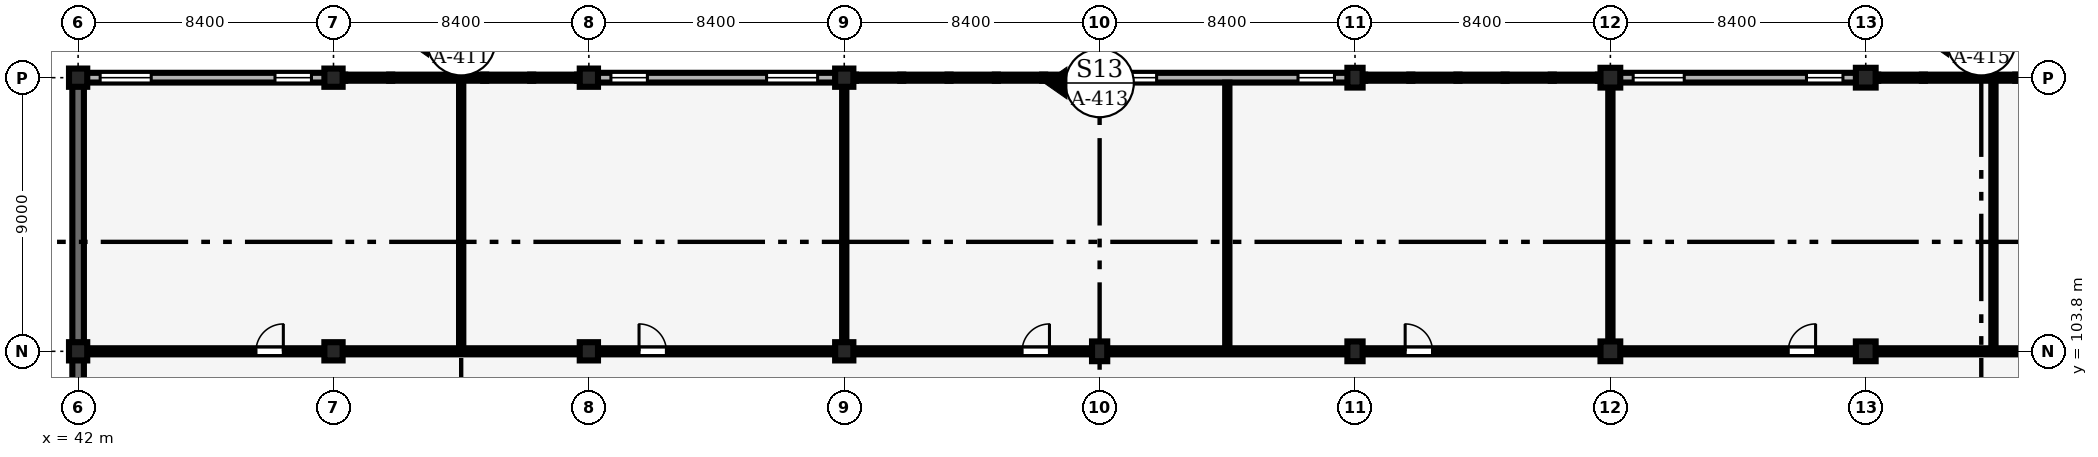
"""IFC4 building model, lengths in metres.
Left out: names, types, materials, properties, quantities, classifications, styles, units other than length and angle.
Written with IfcOpenShell. Run it as: python <this file> out.ifc"""

import sys

from ifc_helpers import new_model, si_unit, direction, frame, frame_2d, origin, origin_2d, place, context, subcontext, project, spatial, rectangle, extrude, element, fill, save


model = new_model("IFC4")
c1 = context("Model", 3, precision=1e-05, world=origin(), true_north=direction((0.0, 1.0)))
c2 = subcontext(c1, "Body", "Model", "MODEL_VIEW")
j1 = project(units=[si_unit("LENGTHUNIT", "METRE"), si_unit("PLANEANGLEUNIT", "RADIAN")], contexts=[c1])
p1 = place(None, origin())
s1 = spatial("IfcSite", under=j1, at=p1, CompositionType="ELEMENT")
p2 = place(p1, origin())
s2 = spatial("IfcBuilding", under=s1, at=p2, CompositionType="ELEMENT")
p3 = place(p2, frame((0.0, 0.0, 4.8)))
s3 = spatial("IfcBuildingStorey", under=s2, at=p3, CompositionType="ELEMENT", Elevation=4.8)
for number, where, z_axis, x_axis in (
    (1, (42.0, 103.8, 0.0), (0.0, 0.0, 1.0), (1.0, 0.0, 0.0)),
    (2, (42.0, 112.8, 0.0), (0.0, 0.0, 1.0), (1.0, 0.0, 0.0)),
    (3, (50.4, 103.8, 0.0), (0.0, 0.0, 1.0), (1.0, 0.0, 0.0)),
    (4, (50.4, 112.8, 0.0), (0.0, 0.0, 1.0), (1.0, 0.0, 0.0)),
    (5, (58.8, 103.8, 0.0), (0.0, 0.0, 1.0), (1.0, 0.0, 0.0)),
    (6, (58.8, 112.8, 0.0), (0.0, 0.0, 1.0), (1.0, 0.0, 0.0)),
    (7, (67.2, 103.8, 0.0), (0.0, 0.0, 1.0), (1.0, 0.0, 0.0)),
    (8, (67.2, 112.8, 0.0), (0.0, 0.0, 1.0), (1.0, 0.0, 0.0)),
):
    element("IfcColumn", number, at=place(p3, frame(where, z_axis=z_axis, x_axis=x_axis)), inside=s3, PredefinedType="COLUMN", context=c2, shape_type="SweptSolid", body=[
        extrude(rectangle(XDim=0.6, YDim=0.6, at=origin_2d()), origin(), (0.0, 0.0, 1.0), 4.2),
    ])
for number, where, z_axis, x_axis in (
    (9, (75.6, 103.8, 0.0), (0.0, 0.0, 1.0), (1.0, 0.0, 0.0)),
    (10, (75.6, 112.8, 0.0), (0.0, 0.0, 1.0), (1.0, 0.0, 0.0)),
    (11, (84.0, 103.8, 0.0), (0.0, 0.0, 1.0), (1.0, 0.0, 0.0)),
    (12, (84.0, 112.8, 0.0), (0.0, 0.0, 1.0), (1.0, 0.0, 0.0)),
):
    element("IfcColumn", number, at=place(p3, frame(where, z_axis=z_axis, x_axis=x_axis)), inside=s3, PredefinedType="COLUMN", context=c2, shape_type="SweptSolid", body=[
        extrude(rectangle(XDim=0.5, YDim=0.65, at=origin_2d()), origin(), (0.0, 0.0, 1.0), 4.2),
    ])
for number, where, z_axis, x_axis in (
    (13, (92.4, 103.8, 0.0), (0.0, 0.0, 1.0), (1.0, 0.0, 0.0)),
    (14, (92.4, 112.8, 0.0), (0.0, 0.0, 1.0), (1.0, 0.0, 0.0)),
    (15, (100.8, 103.8, 0.0), (0.0, 0.0, 1.0), (1.0, 0.0, 0.0)),
    (16, (100.8, 112.8, 0.0), (0.0, 0.0, 1.0), (1.0, 0.0, 0.0)),
):
    element("IfcColumn", number, at=place(p3, frame(where, z_axis=z_axis, x_axis=x_axis)), inside=s3, PredefinedType="COLUMN", context=c2, shape_type="SweptSolid", body=[
        extrude(rectangle(XDim=0.65, YDim=0.65, at=origin_2d()), origin(), (0.0, 0.0, 1.0), 4.2),
    ])
p4 = place(p3, frame((42.275, 112.8, 0.0), z_axis=(0.0, 0.0, 1.0), x_axis=(1.0, 0.0, 0.0)))
e17 = element("IfcWall", 17, at=p4, inside=s3, PredefinedType="SOLIDWALL", context=c2, shape_type="SweptSolid", body=[
    extrude(rectangle(XDim=7.85, YDim=0.32, at=frame_2d((3.925, 0.0))), origin(), (0.0, 0.0, 1.0), 2.77),
])
p5 = place(p4, frame((0.45, 0.0, 0.9)))
e18 = element("IfcOpeningElement", 18, at=p5, cuts=e17, PredefinedType="OPENING", context=c2, shape_type="SweptSolid", body=[
    extrude(rectangle(XDim=1.68, YDim=1.72, at=frame_2d((0.84, 0.86))), frame((0.0, 0.17, 0.0), z_axis=(0.0, -1.0, 0.0), x_axis=(1.0, 0.0, 0.0)), (0.0, 0.0, 1.0), 0.34),
])
p6 = place(p4, frame((6.2, 0.0, 0.9)))
e19 = element("IfcOpeningElement", 19, at=p6, cuts=e17, PredefinedType="OPENING", context=c2, shape_type="SweptSolid", body=[
    extrude(rectangle(XDim=1.2, YDim=1.5, at=frame_2d((0.6, 0.75))), frame((0.0, 0.17, 0.0), z_axis=(0.0, -1.0, 0.0), x_axis=(1.0, 0.0, 0.0)), (0.0, 0.0, 1.0), 0.34),
])
p7 = place(p3, frame((59.075, 112.8, 0.0), z_axis=(0.0, 0.0, 1.0), x_axis=(1.0, 0.0, 0.0)))
e20 = element("IfcWall", 20, at=p7, inside=s3, PredefinedType="SOLIDWALL", context=c2, shape_type="SweptSolid", body=[
    extrude(rectangle(XDim=7.85, YDim=0.32, at=frame_2d((3.925, 0.0))), origin(), (0.0, 0.0, 1.0), 3.32),
])
p8 = place(p7, frame((0.45, 0.0, 0.9)))
e21 = element("IfcOpeningElement", 21, at=p8, cuts=e20, PredefinedType="OPENING", context=c2, shape_type="SweptSolid", body=[
    extrude(rectangle(XDim=1.2, YDim=1.8, at=frame_2d((0.6, 0.9))), frame((0.0, 0.17, 0.0), z_axis=(0.0, -1.0, 0.0), x_axis=(1.0, 0.0, 0.0)), (0.0, 0.0, 1.0), 0.34),
])
p9 = place(p7, frame((5.57, 0.0, 0.9)))
e22 = element("IfcOpeningElement", 22, at=p9, cuts=e20, PredefinedType="OPENING", context=c2, shape_type="SweptSolid", body=[
    extrude(rectangle(XDim=1.68, YDim=2.27, at=frame_2d((0.84, 1.135))), frame((0.0, 0.17, 0.0), z_axis=(0.0, -1.0, 0.0), x_axis=(1.0, 0.0, 0.0)), (0.0, 0.0, 1.0), 0.34),
])
p10 = place(p3, frame((75.825, 112.8, 0.0), z_axis=(0.0, 0.0, 1.0), x_axis=(1.0, 0.0, 0.0)))
e23 = element("IfcWall", 23, at=p10, inside=s3, PredefinedType="SOLIDWALL", context=c2, shape_type="SweptSolid", body=[
    extrude(rectangle(XDim=7.95, YDim=0.32, at=frame_2d((3.975, 0.0))), origin(), (0.0, 0.0, 1.0), 3.22),
])
p11 = place(p10, frame((0.45, 0.0, 0.9)))
e24 = element("IfcOpeningElement", 24, at=p11, cuts=e23, PredefinedType="OPENING", context=c2, shape_type="SweptSolid", body=[
    extrude(rectangle(XDim=1.2, YDim=1.5, at=frame_2d((0.6, 0.75))), frame((0.0, 0.17, 0.0), z_axis=(0.0, -1.0, 0.0), x_axis=(1.0, 0.0, 0.0)), (0.0, 0.0, 1.0), 0.34),
])
p12 = place(p10, frame((6.3, 0.0, 0.9)))
e25 = element("IfcOpeningElement", 25, at=p12, cuts=e23, PredefinedType="OPENING", context=c2, shape_type="SweptSolid", body=[
    extrude(rectangle(XDim=1.2, YDim=1.8, at=frame_2d((0.6, 0.9))), frame((0.0, 0.17, 0.0), z_axis=(0.0, -1.0, 0.0), x_axis=(1.0, 0.0, 0.0)), (0.0, 0.0, 1.0), 0.34),
])
p13 = place(p3, frame((92.7, 112.8, 0.0), z_axis=(0.0, 0.0, 1.0), x_axis=(1.0, 0.0, 0.0)))
e26 = element("IfcWall", 26, at=p13, inside=s3, PredefinedType="SOLIDWALL", context=c2, shape_type="SweptSolid", body=[
    extrude(rectangle(XDim=7.8, YDim=0.32, at=frame_2d((3.9, 0.0))), origin(), (0.0, 0.0, 1.0), 3.12),
])
p14 = place(p13, frame((0.45, 0.0, 0.9)))
e27 = element("IfcOpeningElement", 27, at=p14, cuts=e26, PredefinedType="OPENING", context=c2, shape_type="SweptSolid", body=[
    extrude(rectangle(XDim=1.68, YDim=2.07, at=frame_2d((0.84, 1.035))), frame((0.0, 0.17, 0.0), z_axis=(0.0, -1.0, 0.0), x_axis=(1.0, 0.0, 0.0)), (0.0, 0.0, 1.0), 0.34),
])
p15 = place(p13, frame((6.15, 0.0, 0.9)))
e28 = element("IfcOpeningElement", 28, at=p15, cuts=e26, PredefinedType="OPENING", context=c2, shape_type="SweptSolid", body=[
    extrude(rectangle(XDim=1.2, YDim=1.5, at=frame_2d((0.6, 0.75))), frame((0.0, 0.17, 0.0), z_axis=(0.0, -1.0, 0.0), x_axis=(1.0, 0.0, 0.0)), (0.0, 0.0, 1.0), 0.34),
])
for number, where, z_axis, x_axis in (
    (29, (42.0, 95.075, 0.0), (0.0, 0.0, 1.0), (0.0, 1.0, 0.0)),
    (30, (42.0, 104.075, 0.0), (0.0, 0.0, 1.0), (0.0, 1.0, 0.0)),
):
    element("IfcWall", number, at=place(p3, frame(where, z_axis=z_axis, x_axis=x_axis)), inside=s3, PredefinedType="SHEAR", context=c2, shape_type="SweptSolid", body=[
        extrude(rectangle(XDim=8.45, YDim=0.38, at=frame_2d((4.225, 0.0))), origin(), (0.0, 0.0, 1.0), 3.312),
    ])
p16 = place(p3, frame((54.6, 103.905, 0.0), z_axis=(0.0, 0.0, 1.0), x_axis=(0.0, 1.0, 0.0)))
e31 = element("IfcWall", 31, at=p16, inside=s3, PredefinedType="PARTITIONING", context=c2, shape_type="SweptSolid", body=[
    extrude(rectangle(XDim=8.79, YDim=0.14, at=frame_2d((4.395, 0.0))), origin(), (0.0, 0.0, 1.0), 3.9),
])
p17 = place(p3, frame((67.2, 103.905, 0.0), z_axis=(0.0, 0.0, 1.0), x_axis=(0.0, 1.0, 0.0)))
e32 = element("IfcWall", 32, at=p17, inside=s3, PredefinedType="PARTITIONING", context=c2, shape_type="SweptSolid", body=[
    extrude(rectangle(XDim=8.73, YDim=0.14, at=frame_2d((4.365, 0.0))), origin(), (0.0, 0.0, 1.0), 3.22),
])
p18 = place(p3, frame((79.8, 103.905, 0.0), z_axis=(0.0, 0.0, 1.0), x_axis=(0.0, 1.0, 0.0)))
e33 = element("IfcWall", 33, at=p18, inside=s3, PredefinedType="PARTITIONING", context=c2, shape_type="SweptSolid", body=[
    extrude(rectangle(XDim=8.73, YDim=0.14, at=frame_2d((4.365, 0.0))), origin(), (0.0, 0.0, 1.0), 3.9),
])
p19 = place(p3, frame((92.4, 103.905, 0.0), z_axis=(0.0, 0.0, 1.0), x_axis=(0.0, 1.0, 0.0)))
e34 = element("IfcWall", 34, at=p19, inside=s3, PredefinedType="PARTITIONING", context=c2, shape_type="SweptSolid", body=[
    extrude(rectangle(XDim=8.79, YDim=0.14, at=frame_2d((4.395, 0.0))), origin(), (0.0, 0.0, 1.0), 3.27),
])
p20 = place(p3, frame((105.0, 103.905, 0.0), z_axis=(0.0, 0.0, 1.0), x_axis=(0.0, 1.0, 0.0)))
e35 = element("IfcWall", 35, at=p20, inside=s3, PredefinedType="PARTITIONING", context=c2, shape_type="SweptSolid", body=[
    extrude(rectangle(XDim=8.79, YDim=0.14, at=frame_2d((4.395, 0.0))), origin(), (0.0, 0.0, 1.0), 3.9),
])
p21 = place(p3, frame((42.195, 103.8, 0.0), z_axis=(0.0, 0.0, 1.0), x_axis=(1.0, 0.0, 0.0)))
e36 = element("IfcWall", 36, at=p21, inside=s3, PredefinedType="PARTITIONING", context=c2, shape_type="SweptSolid", body=[
    extrude(rectangle(XDim=7.895, YDim=0.2, at=frame_2d((3.948, 0.0))), origin(), (0.0, 0.0, 1.0), 3.17),
])
p22 = place(p21, frame((5.655, 0.0, 0.0)))
e37 = element("IfcOpeningElement", 37, at=p22, cuts=e36, PredefinedType="OPENING", context=c2, shape_type="SweptSolid", body=[
    extrude(rectangle(XDim=0.9, YDim=2.1, at=frame_2d((0.45, 1.05))), frame((0.0, 0.11, 0.0), z_axis=(0.0, -1.0, 0.0), x_axis=(1.0, 0.0, 0.0)), (0.0, 0.0, 1.0), 0.22),
])
p23 = place(p3, frame((50.71, 103.8, 0.0), z_axis=(0.0, 0.0, 1.0), x_axis=(1.0, 0.0, 0.0)))
e38 = element("IfcWall", 38, at=p23, inside=s3, PredefinedType="PARTITIONING", context=c2, shape_type="SweptSolid", body=[
    extrude(rectangle(XDim=7.78, YDim=0.2, at=frame_2d((3.89, 0.0))), origin(), (0.0, 0.0, 1.0), 3.12),
])
p24 = place(p3, frame((59.11, 103.8, 0.0), z_axis=(0.0, 0.0, 1.0), x_axis=(1.0, 0.0, 0.0)))
e39 = element("IfcWall", 39, at=p24, inside=s3, PredefinedType="PARTITIONING", context=c2, shape_type="SweptSolid", body=[
    extrude(rectangle(XDim=7.78, YDim=0.2, at=frame_2d((3.89, 0.0))), origin(), (0.0, 0.0, 1.0), 3.07),
])
p25 = place(p24, frame((1.34, 0.0, 0.0)))
e40 = element("IfcOpeningElement", 40, at=p25, cuts=e39, PredefinedType="OPENING", context=c2, shape_type="SweptSolid", body=[
    extrude(rectangle(XDim=0.9, YDim=2.1, at=frame_2d((0.45, 1.05))), frame((0.0, 0.11, 0.0), z_axis=(0.0, -1.0, 0.0), x_axis=(1.0, 0.0, 0.0)), (0.0, 0.0, 1.0), 0.22),
])
p26 = place(p3, frame((67.51, 103.8, 0.0), z_axis=(0.0, 0.0, 1.0), x_axis=(1.0, 0.0, 0.0)))
e41 = element("IfcWall", 41, at=p26, inside=s3, PredefinedType="PARTITIONING", context=c2, shape_type="SweptSolid", body=[
    extrude(rectangle(XDim=7.83, YDim=0.2, at=frame_2d((3.915, 0.0))), origin(), (0.0, 0.0, 1.0), 3.07),
])
p27 = place(p26, frame((5.54, 0.0, 0.0)))
e42 = element("IfcOpeningElement", 42, at=p27, cuts=e41, PredefinedType="OPENING", context=c2, shape_type="SweptSolid", body=[
    extrude(rectangle(XDim=0.9, YDim=2.1, at=frame_2d((0.45, 1.05))), frame((0.0, 0.11, 0.0), z_axis=(0.0, -1.0, 0.0), x_axis=(1.0, 0.0, 0.0)), (0.0, 0.0, 1.0), 0.22),
])
p28 = place(p3, frame((75.86, 103.8, 0.0), z_axis=(0.0, 0.0, 1.0), x_axis=(1.0, 0.0, 0.0)))
e43 = element("IfcWall", 43, at=p28, inside=s3, PredefinedType="PARTITIONING", context=c2, shape_type="SweptSolid", body=[
    extrude(rectangle(XDim=7.88, YDim=0.2, at=frame_2d((3.94, 0.0))), origin(), (0.0, 0.0, 1.0), 3.02),
])
p29 = place(p3, frame((84.26, 103.8, 0.0), z_axis=(0.0, 0.0, 1.0), x_axis=(1.0, 0.0, 0.0)))
e44 = element("IfcWall", 44, at=p29, inside=s3, PredefinedType="PARTITIONING", context=c2, shape_type="SweptSolid", body=[
    extrude(rectangle(XDim=7.805, YDim=0.2, at=frame_2d((3.902, 0.0))), origin(), (0.0, 0.0, 1.0), 2.97),
])
p30 = place(p29, frame((1.39, 0.0, 0.0)))
e45 = element("IfcOpeningElement", 45, at=p30, cuts=e44, PredefinedType="OPENING", context=c2, shape_type="SweptSolid", body=[
    extrude(rectangle(XDim=0.9, YDim=2.1, at=frame_2d((0.45, 1.05))), frame((0.0, 0.11, 0.0), z_axis=(0.0, -1.0, 0.0), x_axis=(1.0, 0.0, 0.0)), (0.0, 0.0, 1.0), 0.22),
])
p31 = place(p3, frame((92.735, 103.8, 0.0), z_axis=(0.0, 0.0, 1.0), x_axis=(1.0, 0.0, 0.0)))
e46 = element("IfcWall", 46, at=p31, inside=s3, PredefinedType="PARTITIONING", context=c2, shape_type="SweptSolid", body=[
    extrude(rectangle(XDim=7.73, YDim=0.2, at=frame_2d((3.865, 0.0))), origin(), (0.0, 0.0, 1.0), 3.17),
])
p32 = place(p31, frame((5.515, 0.0, 0.0)))
e47 = element("IfcOpeningElement", 47, at=p32, cuts=e46, PredefinedType="OPENING", context=c2, shape_type="SweptSolid", body=[
    extrude(rectangle(XDim=0.9, YDim=2.1, at=frame_2d((0.45, 1.05))), frame((0.0, 0.11, 0.0), z_axis=(0.0, -1.0, 0.0), x_axis=(1.0, 0.0, 0.0)), (0.0, 0.0, 1.0), 0.22),
])
p33 = place(p3, frame((101.135, 103.8, 0.0), z_axis=(0.0, 0.0, 1.0), x_axis=(1.0, 0.0, 0.0)))
e48 = element("IfcWall", 48, at=p33, inside=s3, PredefinedType="PARTITIONING", context=c2, shape_type="SweptSolid", body=[
    extrude(rectangle(XDim=7.73, YDim=0.2, at=frame_2d((3.865, 0.0))), origin(), (0.0, 0.0, 1.0), 3.12),
])
p34 = place(p5, origin())
e49 = element("IfcWindow", 49, at=p34, inside=s3, PartitioningType="SINGLE_PANEL", PredefinedType="WINDOW", context=c2, shape_type="SweptSolid", body=[
    extrude(rectangle(XDim=1.68, YDim=1.72, at=frame_2d((0.84, 0.86))), frame((0.0, 0.03, 0.0), z_axis=(0.0, -1.0, 0.0), x_axis=(1.0, 0.0, 0.0)), (0.0, 0.0, 1.0), 0.06),
])
fill(e18, e49)
p35 = place(p6, origin())
e50 = element("IfcWindow", 50, at=p35, inside=s3, PartitioningType="SINGLE_PANEL", PredefinedType="WINDOW", context=c2, shape_type="SweptSolid", body=[
    extrude(rectangle(XDim=1.2, YDim=1.5, at=frame_2d((0.6, 0.75))), frame((0.0, 0.03, 0.0), z_axis=(0.0, -1.0, 0.0), x_axis=(1.0, 0.0, 0.0)), (0.0, 0.0, 1.0), 0.06),
])
fill(e19, e50)
p36 = place(p8, origin())
e51 = element("IfcWindow", 51, at=p36, inside=s3, PartitioningType="SINGLE_PANEL", PredefinedType="WINDOW", context=c2, shape_type="SweptSolid", body=[
    extrude(rectangle(XDim=1.2, YDim=1.8, at=frame_2d((0.6, 0.9))), frame((0.0, 0.03, 0.0), z_axis=(0.0, -1.0, 0.0), x_axis=(1.0, 0.0, 0.0)), (0.0, 0.0, 1.0), 0.06),
])
fill(e21, e51)
p37 = place(p9, origin())
e52 = element("IfcWindow", 52, at=p37, inside=s3, PartitioningType="SINGLE_PANEL", PredefinedType="WINDOW", context=c2, shape_type="SweptSolid", body=[
    extrude(rectangle(XDim=1.68, YDim=2.27, at=frame_2d((0.84, 1.135))), frame((0.0, 0.03, 0.0), z_axis=(0.0, -1.0, 0.0), x_axis=(1.0, 0.0, 0.0)), (0.0, 0.0, 1.0), 0.06),
])
fill(e22, e52)
p38 = place(p11, origin())
e53 = element("IfcWindow", 53, at=p38, inside=s3, PartitioningType="SINGLE_PANEL", PredefinedType="WINDOW", context=c2, shape_type="SweptSolid", body=[
    extrude(rectangle(XDim=1.2, YDim=1.5, at=frame_2d((0.6, 0.75))), frame((0.0, 0.03, 0.0), z_axis=(0.0, -1.0, 0.0), x_axis=(1.0, 0.0, 0.0)), (0.0, 0.0, 1.0), 0.06),
])
fill(e24, e53)
p39 = place(p12, origin())
e54 = element("IfcWindow", 54, at=p39, inside=s3, PartitioningType="SINGLE_PANEL", PredefinedType="WINDOW", context=c2, shape_type="SweptSolid", body=[
    extrude(rectangle(XDim=1.2, YDim=1.8, at=frame_2d((0.6, 0.9))), frame((0.0, 0.03, 0.0), z_axis=(0.0, -1.0, 0.0), x_axis=(1.0, 0.0, 0.0)), (0.0, 0.0, 1.0), 0.06),
])
fill(e25, e54)
p40 = place(p14, origin())
e55 = element("IfcWindow", 55, at=p40, inside=s3, PartitioningType="SINGLE_PANEL", PredefinedType="WINDOW", context=c2, shape_type="SweptSolid", body=[
    extrude(rectangle(XDim=1.68, YDim=2.07, at=frame_2d((0.84, 1.035))), frame((0.0, 0.03, 0.0), z_axis=(0.0, -1.0, 0.0), x_axis=(1.0, 0.0, 0.0)), (0.0, 0.0, 1.0), 0.06),
])
fill(e27, e55)
p41 = place(p15, origin())
e56 = element("IfcWindow", 56, at=p41, inside=s3, PartitioningType="SINGLE_PANEL", PredefinedType="WINDOW", context=c2, shape_type="SweptSolid", body=[
    extrude(rectangle(XDim=1.2, YDim=1.5, at=frame_2d((0.6, 0.75))), frame((0.0, 0.03, 0.0), z_axis=(0.0, -1.0, 0.0), x_axis=(1.0, 0.0, 0.0)), (0.0, 0.0, 1.0), 0.06),
])
fill(e28, e56)
p42 = place(p22, origin())
e57 = element("IfcDoor", 57, at=p42, inside=s3, OperationType="SINGLE_SWING_RIGHT", PredefinedType="DOOR", context=c2, shape_type="SweptSolid", body=[
    extrude(rectangle(XDim=0.9, YDim=2.1, at=frame_2d((0.45, 1.05))), frame((0.0, 0.025, 0.0), z_axis=(0.0, -1.0, 0.0), x_axis=(1.0, 0.0, 0.0)), (0.0, 0.0, 1.0), 0.05),
])
fill(e37, e57)
p43 = place(p25, origin())
e58 = element("IfcDoor", 58, at=p43, inside=s3, OperationType="SINGLE_SWING_LEFT", PredefinedType="DOOR", context=c2, shape_type="SweptSolid", body=[
    extrude(rectangle(XDim=0.9, YDim=2.1, at=frame_2d((0.45, 1.05))), frame((0.0, 0.025, 0.0), z_axis=(0.0, -1.0, 0.0), x_axis=(1.0, 0.0, 0.0)), (0.0, 0.0, 1.0), 0.05),
])
fill(e40, e58)
p44 = place(p27, origin())
e59 = element("IfcDoor", 59, at=p44, inside=s3, OperationType="SINGLE_SWING_RIGHT", PredefinedType="DOOR", context=c2, shape_type="SweptSolid", body=[
    extrude(rectangle(XDim=0.9, YDim=2.1, at=frame_2d((0.45, 1.05))), frame((0.0, 0.025, 0.0), z_axis=(0.0, -1.0, 0.0), x_axis=(1.0, 0.0, 0.0)), (0.0, 0.0, 1.0), 0.05),
])
fill(e42, e59)
p45 = place(p30, origin())
e60 = element("IfcDoor", 60, at=p45, inside=s3, OperationType="SINGLE_SWING_LEFT", PredefinedType="DOOR", context=c2, shape_type="SweptSolid", body=[
    extrude(rectangle(XDim=0.9, YDim=2.1, at=frame_2d((0.45, 1.05))), frame((0.0, 0.025, 0.0), z_axis=(0.0, -1.0, 0.0), x_axis=(1.0, 0.0, 0.0)), (0.0, 0.0, 1.0), 0.05),
])
fill(e45, e60)
p46 = place(p32, origin())
e61 = element("IfcDoor", 61, at=p46, inside=s3, OperationType="SINGLE_SWING_RIGHT", PredefinedType="DOOR", context=c2, shape_type="SweptSolid", body=[
    extrude(rectangle(XDim=0.9, YDim=2.1, at=frame_2d((0.45, 1.05))), frame((0.0, 0.025, 0.0), z_axis=(0.0, -1.0, 0.0), x_axis=(1.0, 0.0, 0.0)), (0.0, 0.0, 1.0), 0.05),
])
fill(e47, e61)
save(model, sys.argv[1])
